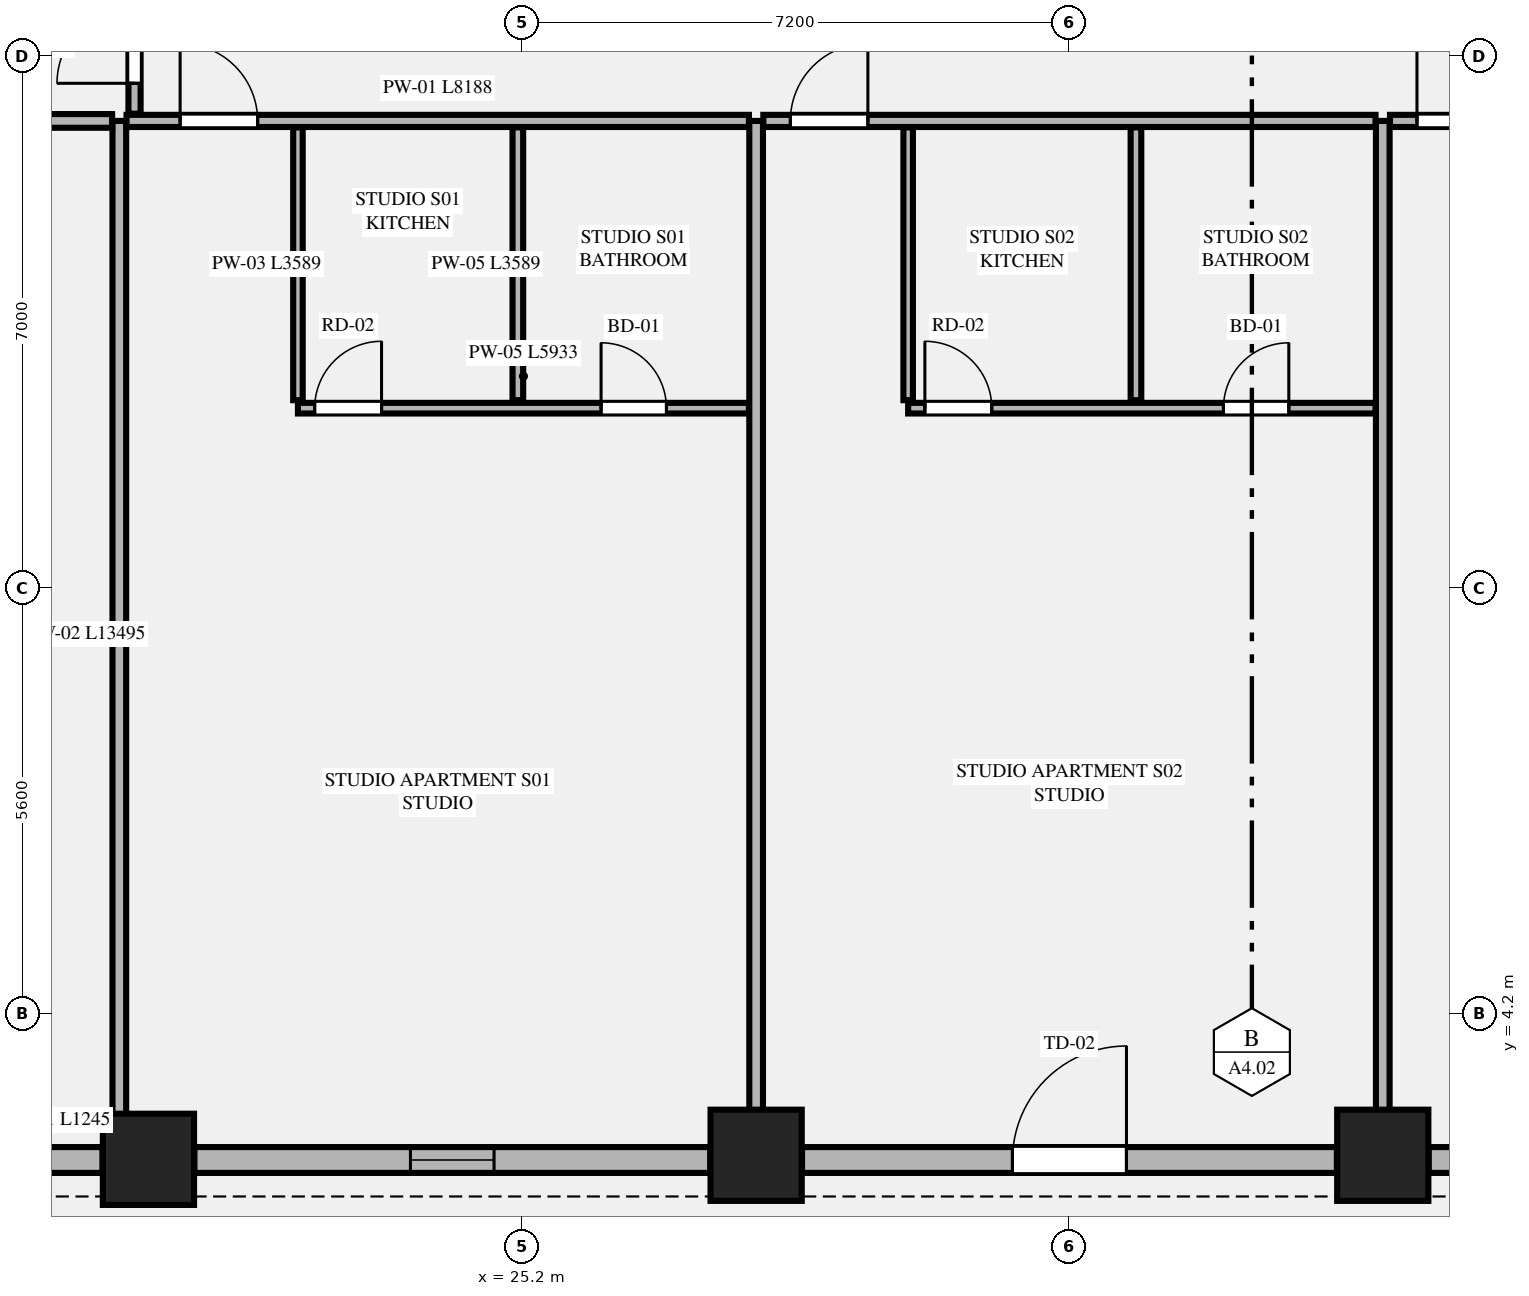
"""IFC4 building model, lengths in metres.
Left out: names, types, materials, properties, quantities, classifications, styles, units other than length and angle.
Written with IfcOpenShell. Run it as: python <this file> out.ifc"""

import sys

from ifc_helpers import new_model, si_unit, direction, frame, frame_2d, origin, origin_2d, place, context, subcontext, project, spatial, rectangle, extrude, element, fill, save


model = new_model("IFC4")
c1 = context("Model", 3, precision=1e-05, world=origin(), true_north=direction((0.0, 1.0)))
c2 = subcontext(c1, "Body", "Model", "MODEL_VIEW")
j1 = project(units=[si_unit("LENGTHUNIT", "METRE"), si_unit("PLANEANGLEUNIT", "RADIAN")], contexts=[c1])
p1 = place(None, origin())
s1 = spatial("IfcSite", under=j1, at=p1, CompositionType="ELEMENT")
p2 = place(p1, origin())
s2 = spatial("IfcBuilding", under=s1, at=p2, CompositionType="ELEMENT")
p3 = place(p2, frame((0.0, 0.0, 24.9)))
s3 = spatial("IfcBuildingStorey", under=s2, at=p3, CompositionType="ELEMENT", Elevation=24.9)
for number, where, z_axis, x_axis in (
    (1, (20.283, 2.289, 0.0), (0.0, 0.0, 1.0), (1.0, 0.0, 0.0)),
    (2, (28.278, 2.342, 0.0), (0.0, 0.0, 1.0), (1.0, 0.0, 0.0)),
    (3, (36.522, 2.342, 0.0), (0.0, 0.0, 1.0), (1.0, 0.0, 0.0)),
):
    element("IfcColumn", number, at=place(p3, frame(where, z_axis=z_axis, x_axis=x_axis)), inside=s3, PredefinedType="COLUMN", context=c2, shape_type="SweptSolid", body=[
        extrude(rectangle(XDim=1.2, YDim=1.2, at=origin_2d()), origin(), (0.0, 0.0, 1.0), 3.55),
    ])
p4 = place(p3, frame((18.434, 2.28, 0.0), z_axis=(0.0, 0.0, 1.0), x_axis=(1.0, 0.0, 0.0)))
e4 = element("IfcWall", 4, at=p4, inside=s3, PredefinedType="STANDARD", context=c2, shape_type="SweptSolid", body=[
    extrude(rectangle(XDim=1.245, YDim=0.34, at=frame_2d((0.623, 0.0))), origin(), (0.0, 0.0, 1.0), 3.33),
])
p5 = place(p3, frame((20.887, 2.28, 0.0), z_axis=(0.0, 0.0, 1.0), x_axis=(1.0, 0.0, 0.0)))
e5 = element("IfcWall", 5, at=p5, inside=s3, PredefinedType="STANDARD", context=c2, shape_type="SweptSolid", body=[
    extrude(rectangle(XDim=6.787, YDim=0.34, at=frame_2d((3.394, 0.0))), origin(), (0.0, 0.0, 1.0), 2.787),
])
p6 = place(p5, frame((2.843, 0.0, 0.75)))
e6 = element("IfcOpeningElement", 6, at=p6, cuts=e5, PredefinedType="OPENING", context=c2, shape_type="SweptSolid", body=[
    extrude(rectangle(XDim=1.1, YDim=1.887, at=frame_2d((0.55, 0.943))), frame((0.0, 0.18, 0.0), z_axis=(0.0, -1.0, 0.0), x_axis=(1.0, 0.0, 0.0)), (0.0, 0.0, 1.0), 0.36),
])
p7 = place(p3, frame((28.882, 2.28, 0.0), z_axis=(0.0, 0.0, 1.0), x_axis=(1.0, 0.0, 0.0)))
e7 = element("IfcWall", 7, at=p7, inside=s3, PredefinedType="STANDARD", context=c2, shape_type="SweptSolid", body=[
    extrude(rectangle(XDim=7.036, YDim=0.34, at=frame_2d((3.518, 0.0))), origin(), (0.0, 0.0, 1.0), 2.787),
])
p8 = place(p7, frame((2.768, 0.0, 0.0)))
e8 = element("IfcOpeningElement", 8, at=p8, cuts=e7, PredefinedType="OPENING", context=c2, shape_type="SweptSolid", body=[
    extrude(rectangle(XDim=1.5, YDim=2.3, at=frame_2d((0.75, 1.15))), frame((0.0, 0.18, 0.0), z_axis=(0.0, -1.0, 0.0), x_axis=(1.0, 0.0, 0.0)), (0.0, 0.0, 1.0), 0.36),
])
p9 = place(p3, frame((37.126, 2.28, 0.0), z_axis=(0.0, 0.0, 1.0), x_axis=(1.0, 0.0, 0.0)))
e9 = element("IfcWall", 9, at=p9, inside=s3, PredefinedType="STANDARD", context=c2, shape_type="SweptSolid", body=[
    extrude(rectangle(XDim=6.787, YDim=0.34, at=frame_2d((3.394, 0.0))), origin(), (0.0, 0.0, 1.0), 2.787),
])
p10 = place(p9, frame((2.843, 0.0, 0.75)))
e10 = element("IfcOpeningElement", 10, at=p10, cuts=e9, PredefinedType="OPENING", context=c2, shape_type="SweptSolid", body=[
    extrude(rectangle(XDim=1.1, YDim=1.887, at=frame_2d((0.55, 0.943))), frame((0.0, 0.18, 0.0), z_axis=(0.0, -1.0, 0.0), x_axis=(1.0, 0.0, 0.0)), (0.0, 0.0, 1.0), 0.36),
])
p11 = place(p3, frame((19.9, 2.455, 0.0), z_axis=(0.0, 0.0, 1.0), x_axis=(0.0, 1.0, 0.0)))
e11 = element("IfcWall", 11, at=p11, inside=s3, PredefinedType="PARTITIONING", context=c2, shape_type="SweptSolid", body=[
    extrude(rectangle(XDim=13.495, YDim=0.18, at=frame_2d((6.748, 0.0))), origin(), (0.0, 0.0, 1.0), 3.33),
])
for number, where, z_axis, x_axis in (
    (12, (28.278, 2.455, 0.0), (0.0, 0.0, 1.0), (0.0, 1.0, 0.0)),
    (13, (36.522, 2.455, 0.0), (0.0, 0.0, 1.0), (0.0, 1.0, 0.0)),
):
    element("IfcWall", number, at=place(p3, frame(where, z_axis=z_axis, x_axis=x_axis)), inside=s3, PredefinedType="PARTITIONING", context=c2, shape_type="SweptSolid", body=[
        extrude(rectangle(XDim=13.495, YDim=0.18, at=frame_2d((6.748, 0.0))), origin(), (0.0, 0.0, 1.0), 2.637),
    ])
p12 = place(p3, frame((19.995, 15.95, 0.0), z_axis=(0.0, 0.0, 1.0), x_axis=(1.0, 0.0, 0.0)))
e14 = element("IfcWall", 14, at=p12, inside=s3, PredefinedType="PARTITIONING", context=c2, shape_type="SweptSolid", body=[
    extrude(rectangle(XDim=8.188, YDim=0.16, at=frame_2d((4.094, 0.0))), origin(), (0.0, 0.0, 1.0), 3.33),
])
p13 = place(p12, frame((0.705, 0.0, 0.0)))
e15 = element("IfcOpeningElement", 15, at=p13, cuts=e14, PredefinedType="OPENING", context=c2, shape_type="SweptSolid", body=[
    extrude(rectangle(XDim=1.02, YDim=2.25, at=frame_2d((0.51, 1.125))), frame((0.0, 0.09, 0.0), z_axis=(0.0, -1.0, 0.0), x_axis=(1.0, 0.0, 0.0)), (0.0, 0.0, 1.0), 0.18),
])
p14 = place(p3, frame((22.25, 12.276, 0.0), z_axis=(0.0, 0.0, 1.0), x_axis=(0.0, 1.0, 0.0)))
e16 = element("IfcWall", 16, at=p14, inside=s3, PredefinedType="PARTITIONING", context=c2, shape_type="SweptSolid", body=[
    extrude(rectangle(XDim=3.589, YDim=0.125, at=frame_2d((1.794, 0.0))), origin(), (0.0, 0.0, 1.0), 2.637),
])
p15 = place(p3, frame((22.25, 12.171, 0.0), z_axis=(0.0, 0.0, 1.0), x_axis=(1.0, 0.0, 0.0)))
e17 = element("IfcWall", 17, at=p15, inside=s3, PredefinedType="PLUMBINGWALL", context=c2, shape_type="SweptSolid", body=[
    extrude(rectangle(XDim=5.933, YDim=0.14, at=frame_2d((2.967, 0.0))), origin(), (0.0, 0.0, 1.0), 3.33),
])
p16 = place(p15, frame((3.988, 0.0, 0.0)))
e18 = element("IfcOpeningElement", 18, at=p16, cuts=e17, PredefinedType="OPENING", context=c2, shape_type="SweptSolid", body=[
    extrude(rectangle(XDim=0.86, YDim=2.1, at=frame_2d((0.43, 1.05))), frame((0.0, 0.08, 0.0), z_axis=(0.0, -1.0, 0.0), x_axis=(1.0, 0.0, 0.0)), (0.0, 0.0, 1.0), 0.16),
])
p17 = place(p15, frame((0.22, 0.0, 0.0)))
e19 = element("IfcOpeningElement", 19, at=p17, cuts=e17, PredefinedType="OPENING", context=c2, shape_type="SweptSolid", body=[
    extrude(rectangle(XDim=0.88, YDim=2.15, at=frame_2d((0.44, 1.075))), frame((0.0, 0.08, 0.0), z_axis=(0.0, -1.0, 0.0), x_axis=(1.0, 0.0, 0.0)), (0.0, 0.0, 1.0), 0.16),
])
p18 = place(p3, frame((25.143, 12.276, 0.0), z_axis=(0.0, 0.0, 1.0), x_axis=(0.0, 1.0, 0.0)))
e20 = element("IfcWall", 20, at=p18, inside=s3, PredefinedType="PLUMBINGWALL", context=c2, shape_type="SweptSolid", body=[
    extrude(rectangle(XDim=3.589, YDim=0.14, at=frame_2d((1.794, 0.0))), origin(), (0.0, 0.0, 1.0), 3.33),
])
p19 = place(p3, frame((28.373, 15.95, 0.0), z_axis=(0.0, 0.0, 1.0), x_axis=(1.0, 0.0, 0.0)))
e21 = element("IfcWall", 21, at=p19, inside=s3, PredefinedType="PARTITIONING", context=c2, shape_type="SweptSolid", body=[
    extrude(rectangle(XDim=8.054, YDim=0.16, at=frame_2d((4.027, 0.0))), origin(), (0.0, 0.0, 1.0), 3.33),
])
p20 = place(p19, frame((0.355, 0.0, 0.0)))
e22 = element("IfcOpeningElement", 22, at=p20, cuts=e21, PredefinedType="OPENING", context=c2, shape_type="SweptSolid", body=[
    extrude(rectangle(XDim=1.02, YDim=2.25, at=frame_2d((0.51, 1.125))), frame((0.0, 0.09, 0.0), z_axis=(0.0, -1.0, 0.0), x_axis=(1.0, 0.0, 0.0)), (0.0, 0.0, 1.0), 0.18),
])
p21 = place(p3, frame((30.278, 12.276, 0.0), z_axis=(0.0, 0.0, 1.0), x_axis=(0.0, 1.0, 0.0)))
e23 = element("IfcWall", 23, at=p21, inside=s3, PredefinedType="PARTITIONING", context=c2, shape_type="SweptSolid", body=[
    extrude(rectangle(XDim=3.589, YDim=0.125, at=frame_2d((1.794, 0.0))), origin(), (0.0, 0.0, 1.0), 3.33),
])
p22 = place(p3, frame((30.278, 12.171, 0.0), z_axis=(0.0, 0.0, 1.0), x_axis=(1.0, 0.0, 0.0)))
e24 = element("IfcWall", 24, at=p22, inside=s3, PredefinedType="PLUMBINGWALL", context=c2, shape_type="SweptSolid", body=[
    extrude(rectangle(XDim=6.149, YDim=0.14, at=frame_2d((3.074, 0.0))), origin(), (0.0, 0.0, 1.0), 3.33),
])
p23 = place(p22, frame((4.148, 0.0, 0.0)))
e25 = element("IfcOpeningElement", 25, at=p23, cuts=e24, PredefinedType="OPENING", context=c2, shape_type="SweptSolid", body=[
    extrude(rectangle(XDim=0.86, YDim=2.1, at=frame_2d((0.43, 1.05))), frame((0.0, 0.08, 0.0), z_axis=(0.0, -1.0, 0.0), x_axis=(1.0, 0.0, 0.0)), (0.0, 0.0, 1.0), 0.16),
])
p24 = place(p22, frame((0.22, 0.0, 0.0)))
e26 = element("IfcOpeningElement", 26, at=p24, cuts=e24, PredefinedType="OPENING", context=c2, shape_type="SweptSolid", body=[
    extrude(rectangle(XDim=0.88, YDim=2.15, at=frame_2d((0.44, 1.075))), frame((0.0, 0.08, 0.0), z_axis=(0.0, -1.0, 0.0), x_axis=(1.0, 0.0, 0.0)), (0.0, 0.0, 1.0), 0.16),
])
p25 = place(p3, frame((33.275, 12.276, 0.0), z_axis=(0.0, 0.0, 1.0), x_axis=(0.0, 1.0, 0.0)))
e27 = element("IfcWall", 27, at=p25, inside=s3, PredefinedType="PLUMBINGWALL", context=c2, shape_type="SweptSolid", body=[
    extrude(rectangle(XDim=3.589, YDim=0.14, at=frame_2d((1.794, 0.0))), origin(), (0.0, 0.0, 1.0), 3.33),
])
p26 = place(p3, frame((36.617, 15.95, 0.0), z_axis=(0.0, 0.0, 1.0), x_axis=(1.0, 0.0, 0.0)))
e28 = element("IfcWall", 28, at=p26, inside=s3, PredefinedType="PARTITIONING", context=c2, shape_type="SweptSolid", body=[
    extrude(rectangle(XDim=8.188, YDim=0.16, at=frame_2d((4.094, 0.0))), origin(), (0.0, 0.0, 1.0), 3.33),
])
p27 = place(p26, frame((0.355, 0.0, 0.0)))
e29 = element("IfcOpeningElement", 29, at=p27, cuts=e28, PredefinedType="OPENING", context=c2, shape_type="SweptSolid", body=[
    extrude(rectangle(XDim=1.02, YDim=2.25, at=frame_2d((0.51, 1.125))), frame((0.0, 0.09, 0.0), z_axis=(0.0, -1.0, 0.0), x_axis=(1.0, 0.0, 0.0)), (0.0, 0.0, 1.0), 0.18),
])
p28 = place(p3, frame((10.564, 15.95, 0.0), z_axis=(0.0, 0.0, 1.0), x_axis=(1.0, 0.0, 0.0)))
e30 = element("IfcWall", 30, at=p28, inside=s3, PredefinedType="PARTITIONING", context=c2, shape_type="SweptSolid", body=[
    extrude(rectangle(XDim=9.241, YDim=0.18, at=frame_2d((4.621, 0.0))), origin(), (0.0, 0.0, 1.0), 3.33),
])
p29 = place(p3, frame((20.1, 16.045, 0.0), z_axis=(0.0, 0.0, 1.0), x_axis=(0.0, 1.0, 0.0)))
e31 = element("IfcWall", 31, at=p29, inside=s3, PredefinedType="PARTITIONING", context=c2, shape_type="SweptSolid", body=[
    extrude(rectangle(XDim=6.377, YDim=0.16, at=frame_2d((3.188, 0.0))), origin(), (0.0, 0.0, 1.0), 3.33),
])
p30 = place(p29, frame((0.4, 0.0, 0.0)))
e32 = element("IfcOpeningElement", 32, at=p30, cuts=e31, PredefinedType="OPENING", context=c2, shape_type="SweptSolid", body=[
    extrude(rectangle(XDim=1.02, YDim=2.25, at=frame_2d((0.51, 1.125))), frame((0.0, 0.09, 0.0), z_axis=(0.0, -1.0, 0.0), x_axis=(1.0, 0.0, 0.0)), (0.0, 0.0, 1.0), 0.18),
])
p31 = place(p6, origin())
e33 = element("IfcWindow", 33, at=p31, inside=s3, PartitioningType="SINGLE_PANEL", PredefinedType="WINDOW", context=c2, shape_type="SweptSolid", body=[
    extrude(rectangle(XDim=1.1, YDim=1.887, at=frame_2d((0.55, 0.943))), frame((0.0, 0.03, 0.0), z_axis=(0.0, -1.0, 0.0), x_axis=(1.0, 0.0, 0.0)), (0.0, 0.0, 1.0), 0.06),
])
fill(e6, e33)
p32 = place(p8, origin())
e34 = element("IfcDoor", 34, at=p32, inside=s3, OperationType="SINGLE_SWING_RIGHT", PredefinedType="DOOR", context=c2, shape_type="SweptSolid", body=[
    extrude(rectangle(XDim=1.5, YDim=2.3, at=frame_2d((0.75, 1.15))), frame((0.0, 0.025, 0.0), z_axis=(0.0, -1.0, 0.0), x_axis=(1.0, 0.0, 0.0)), (0.0, 0.0, 1.0), 0.05),
])
fill(e8, e34)
p33 = place(p16, origin())
e35 = element("IfcDoor", 35, at=p33, inside=s3, OperationType="SINGLE_SWING_LEFT", PredefinedType="DOOR", context=c2, shape_type="SweptSolid", body=[
    extrude(rectangle(XDim=0.86, YDim=2.1, at=frame_2d((0.43, 1.05))), frame((0.0, 0.025, 0.0), z_axis=(0.0, -1.0, 0.0), x_axis=(1.0, 0.0, 0.0)), (0.0, 0.0, 1.0), 0.05),
])
fill(e18, e35)
p34 = place(p13, origin())
e36 = element("IfcDoor", 36, at=p34, inside=s3, OperationType="SINGLE_SWING_LEFT", PredefinedType="DOOR", context=c2, shape_type="SweptSolid", body=[
    extrude(rectangle(XDim=1.02, YDim=2.25, at=frame_2d((0.51, 1.125))), frame((0.0, 0.025, 0.0), z_axis=(0.0, -1.0, 0.0), x_axis=(1.0, 0.0, 0.0)), (0.0, 0.0, 1.0), 0.05),
])
fill(e15, e36)
p35 = place(p17, origin())
e37 = element("IfcDoor", 37, at=p35, inside=s3, OperationType="SINGLE_SWING_RIGHT", PredefinedType="DOOR", context=c2, shape_type="SweptSolid", body=[
    extrude(rectangle(XDim=0.88, YDim=2.15, at=frame_2d((0.44, 1.075))), frame((0.0, 0.025, 0.0), z_axis=(0.0, -1.0, 0.0), x_axis=(1.0, 0.0, 0.0)), (0.0, 0.0, 1.0), 0.05),
])
fill(e19, e37)
p36 = place(p23, origin())
e38 = element("IfcDoor", 38, at=p36, inside=s3, OperationType="SINGLE_SWING_RIGHT", PredefinedType="DOOR", context=c2, shape_type="SweptSolid", body=[
    extrude(rectangle(XDim=0.86, YDim=2.1, at=frame_2d((0.43, 1.05))), frame((0.0, 0.025, 0.0), z_axis=(0.0, -1.0, 0.0), x_axis=(1.0, 0.0, 0.0)), (0.0, 0.0, 1.0), 0.05),
])
fill(e25, e38)
p37 = place(p20, origin())
e39 = element("IfcDoor", 39, at=p37, inside=s3, OperationType="SINGLE_SWING_RIGHT", PredefinedType="DOOR", context=c2, shape_type="SweptSolid", body=[
    extrude(rectangle(XDim=1.02, YDim=2.25, at=frame_2d((0.51, 1.125))), frame((0.0, 0.025, 0.0), z_axis=(0.0, -1.0, 0.0), x_axis=(1.0, 0.0, 0.0)), (0.0, 0.0, 1.0), 0.05),
])
fill(e22, e39)
p38 = place(p24, origin())
e40 = element("IfcDoor", 40, at=p38, inside=s3, OperationType="SINGLE_SWING_LEFT", PredefinedType="DOOR", context=c2, shape_type="SweptSolid", body=[
    extrude(rectangle(XDim=0.88, YDim=2.15, at=frame_2d((0.44, 1.075))), frame((0.0, 0.025, 0.0), z_axis=(0.0, -1.0, 0.0), x_axis=(1.0, 0.0, 0.0)), (0.0, 0.0, 1.0), 0.05),
])
fill(e26, e40)
p39 = place(p27, origin())
e41 = element("IfcDoor", 41, at=p39, inside=s3, OperationType="SINGLE_SWING_LEFT", PredefinedType="DOOR", context=c2, shape_type="SweptSolid", body=[
    extrude(rectangle(XDim=1.02, YDim=2.25, at=frame_2d((0.51, 1.125))), frame((0.0, 0.025, 0.0), z_axis=(0.0, -1.0, 0.0), x_axis=(1.0, 0.0, 0.0)), (0.0, 0.0, 1.0), 0.05),
])
fill(e29, e41)
p40 = place(p30, origin())
e42 = element("IfcDoor", 42, at=p40, inside=s3, OperationType="SINGLE_SWING_LEFT", PredefinedType="DOOR", context=c2, shape_type="SweptSolid", body=[
    extrude(rectangle(XDim=1.02, YDim=2.25, at=frame_2d((0.51, 1.125))), frame((0.0, 0.025, 0.0), z_axis=(0.0, -1.0, 0.0), x_axis=(1.0, 0.0, 0.0)), (0.0, 0.0, 1.0), 0.05),
])
fill(e32, e42)
save(model, sys.argv[1])
